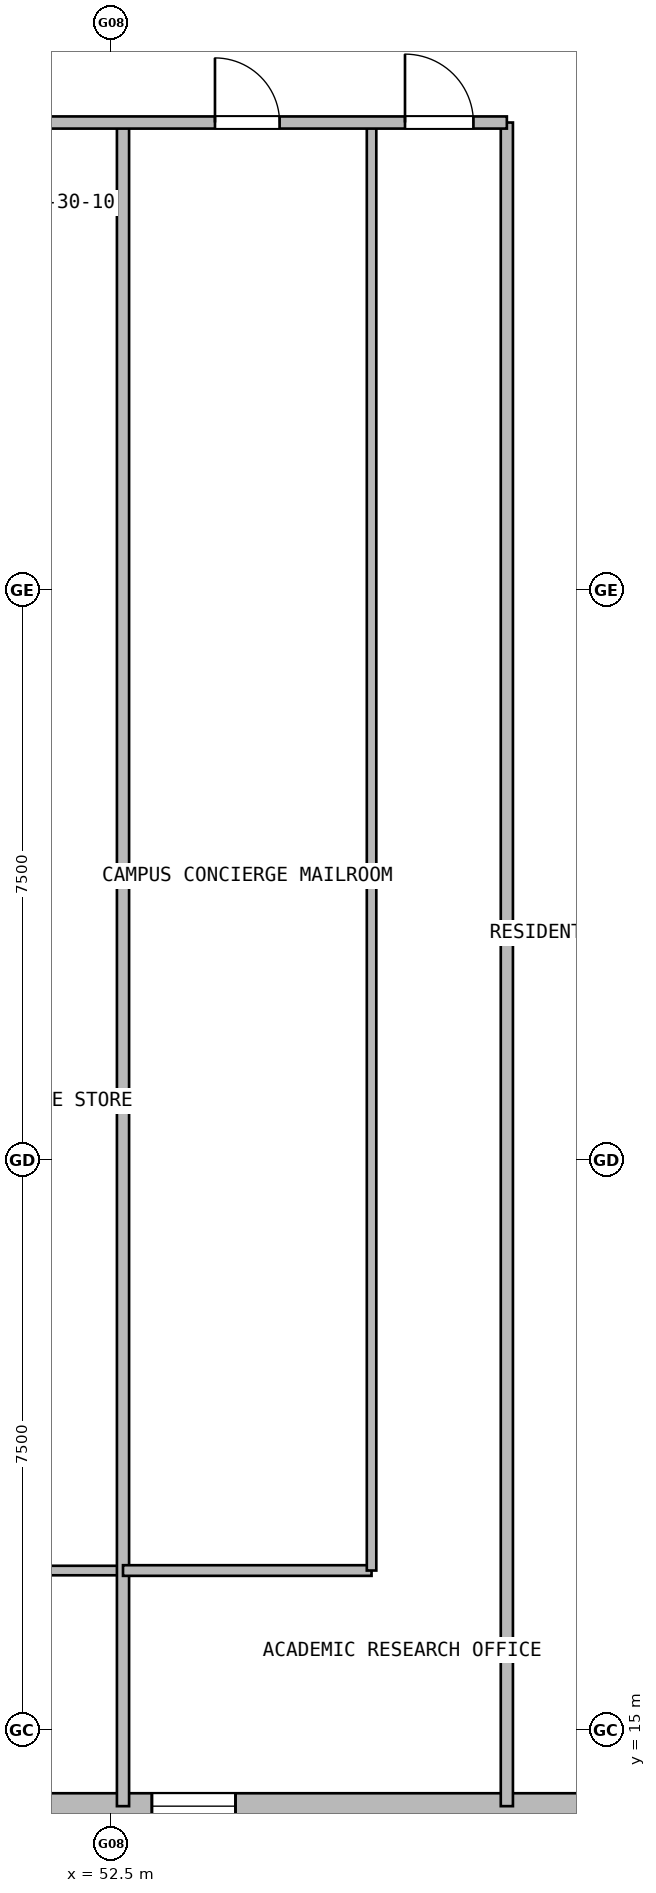
"""IFC4 building model, lengths in metres.
Left out: names, types, materials, properties, quantities, classifications, styles, units other than length and angle.
Written with IfcOpenShell. Run it as: python <this file> out.ifc"""

import sys

from ifc_helpers import new_model, si_unit, direction, frame, frame_2d, origin, place, context, subcontext, project, spatial, rectangle, extrude, element, fill, save


model = new_model("IFC4")
c1 = context("Model", 3, precision=1e-05, world=origin(), true_north=direction((0.0, 1.0)))
c2 = subcontext(c1, "Body", "Model", "MODEL_VIEW")
j1 = project(units=[si_unit("LENGTHUNIT", "METRE"), si_unit("PLANEANGLEUNIT", "RADIAN")], contexts=[c1])
p1 = place(None, origin())
s1 = spatial("IfcSite", under=j1, at=p1, CompositionType="ELEMENT")
p2 = place(p1, origin())
s2 = spatial("IfcBuilding", under=s1, at=p2, CompositionType="ELEMENT")
p3 = place(p2, frame((0.0, 0.0, 30.6)))
s3 = spatial("IfcBuildingStorey", under=s2, at=p3, CompositionType="ELEMENT", Elevation=30.6)
p4 = place(p3, frame((62.2, 14.0, 0.0), z_axis=(0.0, 0.0, 1.0), x_axis=(-1.0, 0.0, 0.0)))
e1 = element("IfcWall", 1, at=p4, inside=s3, PredefinedType="SOLIDWALL", context=c2, shape_type="SweptSolid", body=[
    extrude(rectangle(XDim=49.4, YDim=0.34, at=frame_2d((24.7, 0.0))), origin(), (0.0, 0.0, 1.0), 3.03),
])
p5 = place(p4, frame((35.197, 0.0, 0.0)))
e2 = element("IfcOpeningElement", 2, at=p5, cuts=e1, PredefinedType="OPENING", context=c2, shape_type="SweptSolid", body=[
    extrude(rectangle(XDim=1.05, YDim=2.1, at=frame_2d((0.525, 1.05))), frame((0.0, 0.18, 0.0), z_axis=(0.0, -1.0, 0.0), x_axis=(1.0, 0.0, 0.0)), (0.0, 0.0, 1.0), 0.36),
])
p6 = place(p4, frame((40.23, 0.0, 0.8)))
e3 = element("IfcOpeningElement", 3, at=p6, cuts=e1, PredefinedType="OPENING", context=c2, shape_type="SweptSolid", body=[
    extrude(rectangle(XDim=1.1, YDim=1.5, at=frame_2d((0.55, 0.75))), frame((0.0, 0.18, 0.0), z_axis=(0.0, -1.0, 0.0), x_axis=(1.0, 0.0, 0.0)), (0.0, 0.0, 1.0), 0.36),
])
p7 = place(p4, frame((36.614, 0.0, 0.8)))
e4 = element("IfcOpeningElement", 4, at=p7, cuts=e1, PredefinedType="OPENING", context=c2, shape_type="SweptSolid", body=[
    extrude(rectangle(XDim=1.9, YDim=1.85, at=frame_2d((0.95, 0.925))), frame((0.0, 0.18, 0.0), z_axis=(0.0, -1.0, 0.0), x_axis=(1.0, 0.0, 0.0)), (0.0, 0.0, 1.0), 0.36),
])
p8 = place(p4, frame((26.275, 0.0, 0.8)))
e5 = element("IfcOpeningElement", 5, at=p8, cuts=e1, PredefinedType="OPENING", context=c2, shape_type="SweptSolid", body=[
    extrude(rectangle(XDim=1.9, YDim=1.85, at=frame_2d((0.95, 0.925))), frame((0.0, 0.18, 0.0), z_axis=(0.0, -1.0, 0.0), x_axis=(1.0, 0.0, 0.0)), (0.0, 0.0, 1.0), 0.36),
])
p9 = place(p4, frame((16.175, 0.0, 0.8)))
e6 = element("IfcOpeningElement", 6, at=p9, cuts=e1, PredefinedType="OPENING", context=c2, shape_type="SweptSolid", body=[
    extrude(rectangle(XDim=1.9, YDim=1.85, at=frame_2d((0.95, 0.925))), frame((0.0, 0.18, 0.0), z_axis=(0.0, -1.0, 0.0), x_axis=(1.0, 0.0, 0.0)), (0.0, 0.0, 1.0), 0.36),
])
p10 = place(p4, frame((11.125, 0.0, 0.8)))
e7 = element("IfcOpeningElement", 7, at=p10, cuts=e1, PredefinedType="OPENING", context=c2, shape_type="SweptSolid", body=[
    extrude(rectangle(XDim=1.9, YDim=1.85, at=frame_2d((0.95, 0.925))), frame((0.0, 0.18, 0.0), z_axis=(0.0, -1.0, 0.0), x_axis=(1.0, 0.0, 0.0)), (0.0, 0.0, 1.0), 0.36),
])
p11 = place(p4, frame((8.07, 0.0, 0.8)))
e8 = element("IfcOpeningElement", 8, at=p11, cuts=e1, PredefinedType="OPENING", context=c2, shape_type="SweptSolid", body=[
    extrude(rectangle(XDim=1.1, YDim=1.5, at=frame_2d((0.55, 0.75))), frame((0.0, 0.18, 0.0), z_axis=(0.0, -1.0, 0.0), x_axis=(1.0, 0.0, 0.0)), (0.0, 0.0, 1.0), 0.36),
])
p12 = place(p3, frame((57.7, 14.0, 0.0), z_axis=(0.0, 0.0, 1.0), x_axis=(0.0, 1.0, 0.0)))
e9 = element("IfcWall", 9, at=p12, inside=s3, PredefinedType="PARTITIONING", context=c2, shape_type="SweptSolid", body=[
    extrude(rectangle(XDim=22.15, YDim=0.16, at=frame_2d((11.075, 0.0))), origin(), (0.0, 0.0, 1.0), 3.03),
])
p13 = place(p3, frame((49.38, 17.1, 0.0), z_axis=(0.0, 0.0, 1.0), x_axis=(1.0, 0.0, 0.0)))
e10 = element("IfcWall", 10, at=p13, inside=s3, PredefinedType="PARTITIONING", context=c2, shape_type="SweptSolid", body=[
    extrude(rectangle(XDim=3.27, YDim=0.125, at=frame_2d((1.635, 0.0))), origin(), (0.0, 0.0, 1.0), 3.03),
])
p14 = place(p3, frame((52.65, 14.0, 0.0), z_axis=(0.0, 0.0, 1.0), x_axis=(0.0, 1.0, 0.0)))
e11 = element("IfcWall", 11, at=p14, inside=s3, PredefinedType="PARTITIONING", context=c2, shape_type="SweptSolid", body=[
    extrude(rectangle(XDim=22.15, YDim=0.16, at=frame_2d((11.075, 0.0))), origin(), (0.0, 0.0, 1.0), 3.03),
])
p15 = place(p3, frame((52.65, 17.1, 0.0), z_axis=(0.0, 0.0, 1.0), x_axis=(1.0, 0.0, 0.0)))
e12 = element("IfcWall", 12, at=p15, inside=s3, PredefinedType="PARTITIONING", context=c2, shape_type="SweptSolid", body=[
    extrude(rectangle(XDim=3.27, YDim=0.14, at=frame_2d((1.635, 0.0))), origin(), (0.0, 0.0, 1.0), 3.03),
])
p16 = place(p3, frame((55.92, 17.1, 0.0), z_axis=(0.0, 0.0, 1.0), x_axis=(0.0, 1.0, 0.0)))
e13 = element("IfcWall", 13, at=p16, inside=s3, PredefinedType="PARTITIONING", context=c2, shape_type="SweptSolid", body=[
    extrude(rectangle(XDim=19.05, YDim=0.125, at=frame_2d((9.525, 0.0))), origin(), (0.0, 0.0, 1.0), 3.03),
])
p17 = place(p3, frame((17.3, 36.15, 0.0), z_axis=(0.0, 0.0, 1.0), x_axis=(1.0, 0.0, 0.0)))
e14 = element("IfcWall", 14, at=p17, inside=s3, PredefinedType="PARTITIONING", context=c2, shape_type="SweptSolid", body=[
    extrude(rectangle(XDim=40.4, YDim=0.16, at=frame_2d((20.2, 0.0))), origin(), (0.0, 0.0, 1.0), 3.03),
])
p18 = place(p17, frame((2.99, 0.0, 0.0)))
e15 = element("IfcOpeningElement", 15, at=p18, cuts=e14, PredefinedType="OPENING", context=c2, shape_type="SweptSolid", body=[
    extrude(rectangle(XDim=0.85, YDim=2.05, at=frame_2d((0.425, 1.025))), frame((0.0, 0.09, 0.0), z_axis=(0.0, -1.0, 0.0), x_axis=(1.0, 0.0, 0.0)), (0.0, 0.0, 1.0), 0.18),
])
p19 = place(p17, frame((0.44, 0.0, 0.0)))
e16 = element("IfcOpeningElement", 16, at=p19, cuts=e14, PredefinedType="OPENING", context=c2, shape_type="SweptSolid", body=[
    extrude(rectangle(XDim=0.9, YDim=2.05, at=frame_2d((0.45, 1.025))), frame((0.0, 0.09, 0.0), z_axis=(0.0, -1.0, 0.0), x_axis=(1.0, 0.0, 0.0)), (0.0, 0.0, 1.0), 0.18),
])
p20 = place(p17, frame((6.26, 0.0, 0.0)))
e17 = element("IfcOpeningElement", 17, at=p20, cuts=e14, PredefinedType="OPENING", context=c2, shape_type="SweptSolid", body=[
    extrude(rectangle(XDim=0.85, YDim=2.05, at=frame_2d((0.425, 1.025))), frame((0.0, 0.09, 0.0), z_axis=(0.0, -1.0, 0.0), x_axis=(1.0, 0.0, 0.0)), (0.0, 0.0, 1.0), 0.18),
])
p21 = place(p17, frame((8.76, 0.0, 0.0)))
e18 = element("IfcOpeningElement", 18, at=p21, cuts=e14, PredefinedType="OPENING", context=c2, shape_type="SweptSolid", body=[
    extrude(rectangle(XDim=0.9, YDim=2.05, at=frame_2d((0.45, 1.025))), frame((0.0, 0.09, 0.0), z_axis=(0.0, -1.0, 0.0), x_axis=(1.0, 0.0, 0.0)), (0.0, 0.0, 1.0), 0.18),
])
p22 = place(p17, frame((12.15, 0.0, 0.0)))
e19 = element("IfcOpeningElement", 19, at=p22, cuts=e14, PredefinedType="OPENING", context=c2, shape_type="SweptSolid", body=[
    extrude(rectangle(XDim=0.95, YDim=2.1, at=frame_2d((0.475, 1.05))), frame((0.0, 0.09, 0.0), z_axis=(0.0, -1.0, 0.0), x_axis=(1.0, 0.0, 0.0)), (0.0, 0.0, 1.0), 0.18),
])
p23 = place(p17, frame((17.225, 0.0, 0.0)))
e20 = element("IfcOpeningElement", 20, at=p23, cuts=e14, PredefinedType="OPENING", context=c2, shape_type="SweptSolid", body=[
    extrude(rectangle(XDim=0.9, YDim=2.05, at=frame_2d((0.45, 1.025))), frame((0.0, 0.09, 0.0), z_axis=(0.0, -1.0, 0.0), x_axis=(1.0, 0.0, 0.0)), (0.0, 0.0, 1.0), 0.18),
])
p24 = place(p17, frame((22.275, 0.0, 0.0)))
e21 = element("IfcOpeningElement", 21, at=p24, cuts=e14, PredefinedType="OPENING", context=c2, shape_type="SweptSolid", body=[
    extrude(rectangle(XDim=0.9, YDim=2.05, at=frame_2d((0.45, 1.025))), frame((0.0, 0.09, 0.0), z_axis=(0.0, -1.0, 0.0), x_axis=(1.0, 0.0, 0.0)), (0.0, 0.0, 1.0), 0.18),
])
p25 = place(p17, frame((26.46, 0.0, 0.0)))
e22 = element("IfcOpeningElement", 22, at=p25, cuts=e14, PredefinedType="OPENING", context=c2, shape_type="SweptSolid", body=[
    extrude(rectangle(XDim=0.85, YDim=2.05, at=frame_2d((0.425, 1.025))), frame((0.0, 0.09, 0.0), z_axis=(0.0, -1.0, 0.0), x_axis=(1.0, 0.0, 0.0)), (0.0, 0.0, 1.0), 0.18),
])
p26 = place(p17, frame((28.96, 0.0, 0.0)))
e23 = element("IfcOpeningElement", 23, at=p26, cuts=e14, PredefinedType="OPENING", context=c2, shape_type="SweptSolid", body=[
    extrude(rectangle(XDim=0.9, YDim=2.05, at=frame_2d((0.45, 1.025))), frame((0.0, 0.09, 0.0), z_axis=(0.0, -1.0, 0.0), x_axis=(1.0, 0.0, 0.0)), (0.0, 0.0, 1.0), 0.18),
])
p27 = place(p17, frame((33.29, 0.0, 0.0)))
e24 = element("IfcOpeningElement", 24, at=p27, cuts=e14, PredefinedType="OPENING", context=c2, shape_type="SweptSolid", body=[
    extrude(rectangle(XDim=0.85, YDim=2.05, at=frame_2d((0.425, 1.025))), frame((0.0, 0.09, 0.0), z_axis=(0.0, -1.0, 0.0), x_axis=(1.0, 0.0, 0.0)), (0.0, 0.0, 1.0), 0.18),
])
p28 = place(p17, frame((30.74, 0.0, 0.0)))
e25 = element("IfcOpeningElement", 25, at=p28, cuts=e14, PredefinedType="OPENING", context=c2, shape_type="SweptSolid", body=[
    extrude(rectangle(XDim=0.9, YDim=2.05, at=frame_2d((0.45, 1.025))), frame((0.0, 0.09, 0.0), z_axis=(0.0, -1.0, 0.0), x_axis=(1.0, 0.0, 0.0)), (0.0, 0.0, 1.0), 0.18),
])
p29 = place(p17, frame((36.56, 0.0, 0.0)))
e26 = element("IfcOpeningElement", 26, at=p29, cuts=e14, PredefinedType="OPENING", context=c2, shape_type="SweptSolid", body=[
    extrude(rectangle(XDim=0.85, YDim=2.05, at=frame_2d((0.425, 1.025))), frame((0.0, 0.09, 0.0), z_axis=(0.0, -1.0, 0.0), x_axis=(1.0, 0.0, 0.0)), (0.0, 0.0, 1.0), 0.18),
])
p30 = place(p17, frame((39.06, 0.0, 0.0)))
e27 = element("IfcOpeningElement", 27, at=p30, cuts=e14, PredefinedType="OPENING", context=c2, shape_type="SweptSolid", body=[
    extrude(rectangle(XDim=0.9, YDim=2.05, at=frame_2d((0.45, 1.025))), frame((0.0, 0.09, 0.0), z_axis=(0.0, -1.0, 0.0), x_axis=(1.0, 0.0, 0.0)), (0.0, 0.0, 1.0), 0.18),
])
p31 = place(p11, origin())
e28 = element("IfcWindow", 28, at=p31, inside=s3, PartitioningType="SINGLE_PANEL", PredefinedType="WINDOW", context=c2, shape_type="SweptSolid", body=[
    extrude(rectangle(XDim=1.1, YDim=1.5, at=frame_2d((0.55, 0.75))), frame((0.0, 0.03, 0.0), z_axis=(0.0, -1.0, 0.0), x_axis=(1.0, 0.0, 0.0)), (0.0, 0.0, 1.0), 0.06),
])
fill(e8, e28)
p32 = place(p29, origin())
e29 = element("IfcDoor", 29, at=p32, inside=s3, OperationType="SINGLE_SWING_LEFT", PredefinedType="DOOR", context=c2, shape_type="SweptSolid", body=[
    extrude(rectangle(XDim=0.85, YDim=2.05, at=frame_2d((0.425, 1.025))), frame((0.0, 0.025, 0.0), z_axis=(0.0, -1.0, 0.0), x_axis=(1.0, 0.0, 0.0)), (0.0, 0.0, 1.0), 0.05),
])
fill(e26, e29)
p33 = place(p30, origin())
e30 = element("IfcDoor", 30, at=p33, inside=s3, OperationType="SINGLE_SWING_RIGHT", PredefinedType="DOOR", context=c2, shape_type="SweptSolid", body=[
    extrude(rectangle(XDim=0.9, YDim=2.05, at=frame_2d((0.45, 1.025))), frame((0.0, 0.025, 0.0), z_axis=(0.0, -1.0, 0.0), x_axis=(1.0, 0.0, 0.0)), (0.0, 0.0, 1.0), 0.05),
])
fill(e27, e30)
save(model, sys.argv[1])
